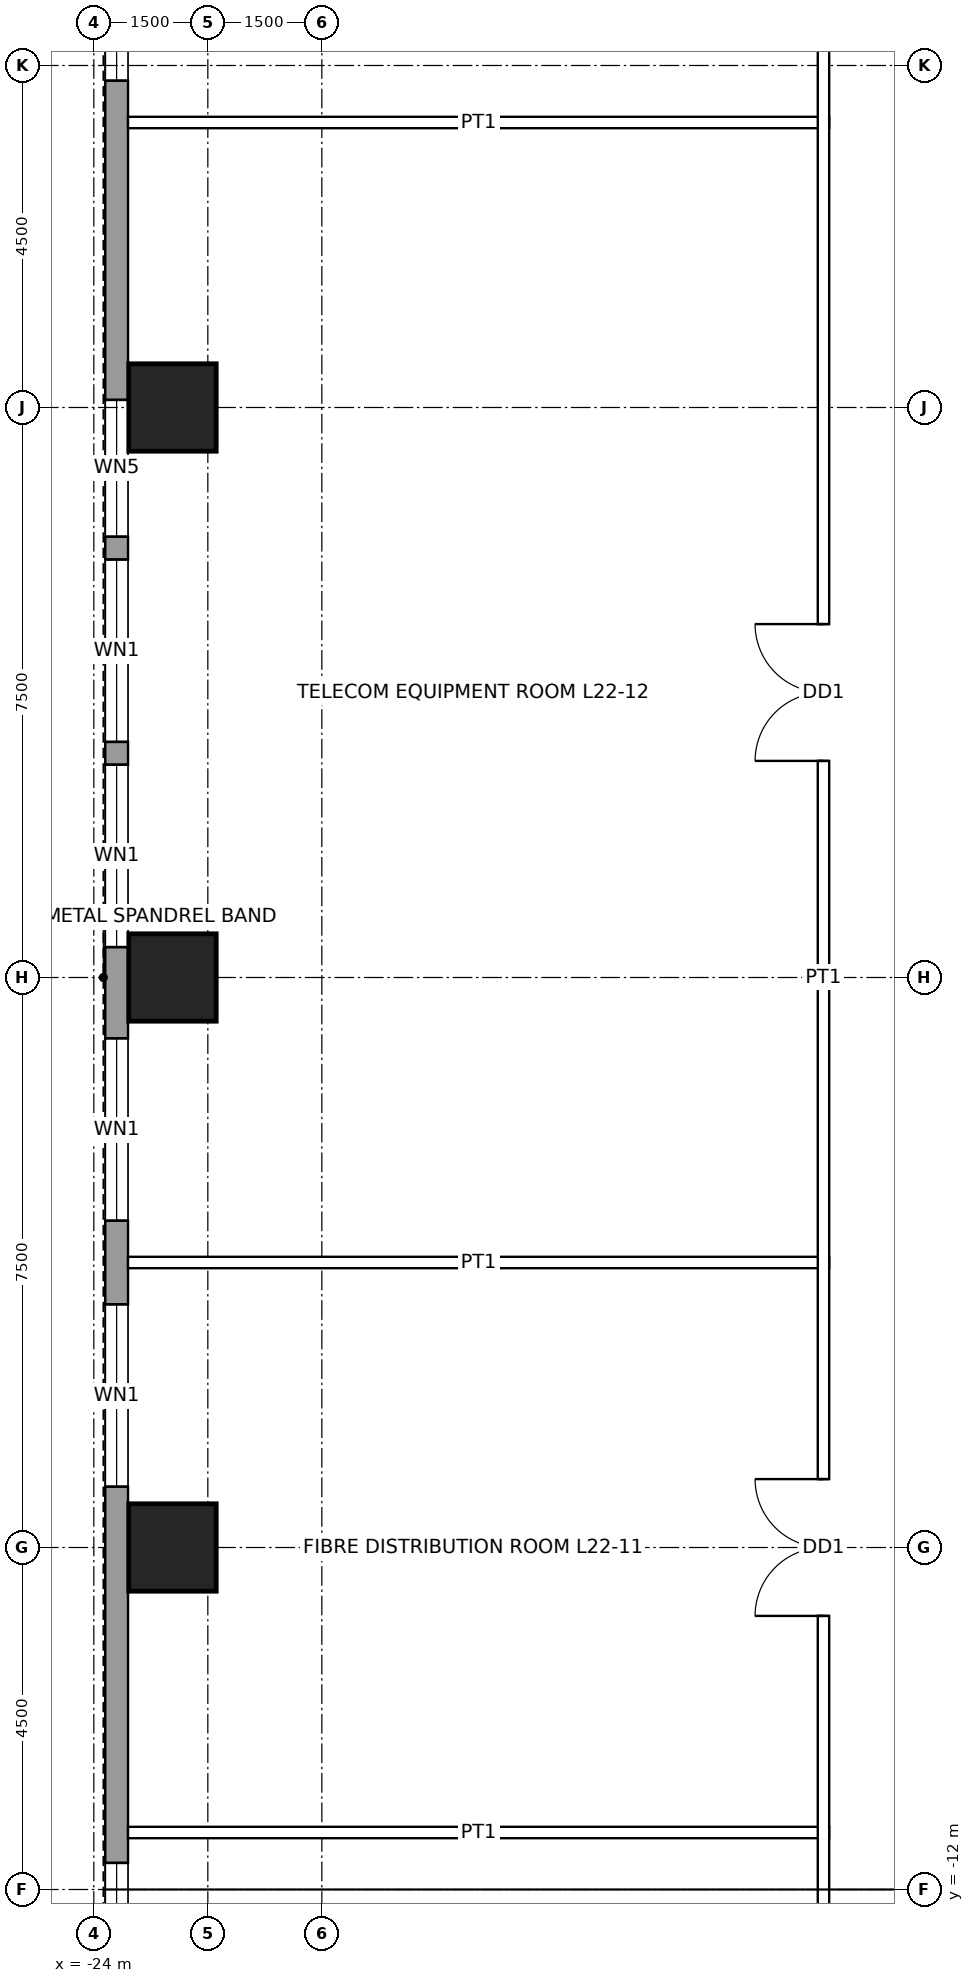
"""IFC4 building model, lengths in metres.
Left out: names, types, materials, properties, quantities, classifications, styles, units other than length and angle.
Written with IfcOpenShell. Run it as: python <this file> out.ifc"""

import sys

from ifc_helpers import new_model, si_unit, direction, frame, frame_2d, origin, origin_2d, place, context, subcontext, project, spatial, rectangle, hollow_rectangle, extrude, element, fill, save


model = new_model("IFC4")
c1 = context("Model", 3, precision=1e-05, world=origin(), true_north=direction((0.0, 1.0)))
c2 = subcontext(c1, "Body", "Model", "MODEL_VIEW")
j1 = project(units=[si_unit("LENGTHUNIT", "METRE"), si_unit("PLANEANGLEUNIT", "RADIAN")], contexts=[c1])
p1 = place(None, origin())
s1 = spatial("IfcSite", under=j1, at=p1, CompositionType="ELEMENT")
p2 = place(p1, origin())
s2 = spatial("IfcBuilding", under=s1, at=p2, CompositionType="ELEMENT")
p3 = place(p2, frame((0.0, 0.0, 113.4)))
s3 = spatial("IfcBuildingStorey", under=s2, at=p3, CompositionType="ELEMENT", Elevation=113.4)
for number, where, z_axis, x_axis in (
    (1, (-22.965, -7.5, 0.0), (0.0, 0.0, 1.0), (1.0, 0.0, 0.0)),
    (2, (-22.965, 0.0, 0.0), (0.0, 0.0, 1.0), (1.0, 0.0, 0.0)),
    (3, (-22.965, 7.5, 0.0), (0.0, 0.0, 1.0), (1.0, 0.0, 0.0)),
):
    element("IfcColumn", number, at=place(p3, frame(where, z_axis=z_axis, x_axis=x_axis)), inside=s3, PredefinedType="COLUMN", context=c2, shape_type="SweptSolid", body=[
        extrude(hollow_rectangle(XDim=1.15, YDim=1.15, WallThickness=0.075, at=origin_2d()), origin(), (0.0, 0.0, 1.0), 4.5),
    ])
p4 = place(p3, frame((-23.7, -16.2, 0.0), z_axis=(0.0, 0.0, 1.0), x_axis=(0.0, 1.0, 0.0)))
e4 = element("IfcWall", 4, at=p4, inside=s3, PredefinedType="SOLIDWALL", context=c2, shape_type="SweptSolid", body=[
    extrude(rectangle(XDim=32.4, YDim=0.3, at=frame_2d((16.2, 0.0))), origin(), (0.0, 0.0, 1.0), 4.3),
])
p5 = place(p4, frame((0.65, 0.0, 1.0)))
e5 = element("IfcOpeningElement", 5, at=p5, cuts=e4, PredefinedType="OPENING", context=c2, shape_type="SweptSolid", body=[
    extrude(rectangle(XDim=1.8, YDim=1.2, at=frame_2d((0.9, 0.6))), frame((0.0, 0.16, 0.0), z_axis=(0.0, -1.0, 0.0), x_axis=(1.0, 0.0, 0.0)), (0.0, 0.0, 1.0), 0.32),
])
p6 = place(p4, frame((2.75, 0.0, 1.0)))
e6 = element("IfcOpeningElement", 6, at=p6, cuts=e4, PredefinedType="OPENING", context=c2, shape_type="SweptSolid", body=[
    extrude(rectangle(XDim=1.8, YDim=1.2, at=frame_2d((0.9, 0.6))), frame((0.0, 0.16, 0.0), z_axis=(0.0, -1.0, 0.0), x_axis=(1.0, 0.0, 0.0)), (0.0, 0.0, 1.0), 0.32),
])
p7 = place(p4, frame((9.5, 0.0, 1.0)))
e7 = element("IfcOpeningElement", 7, at=p7, cuts=e4, PredefinedType="OPENING", context=c2, shape_type="SweptSolid", body=[
    extrude(rectangle(XDim=2.4, YDim=1.2, at=frame_2d((1.2, 0.6))), frame((0.0, 0.16, 0.0), z_axis=(0.0, -1.0, 0.0), x_axis=(1.0, 0.0, 0.0)), (0.0, 0.0, 1.0), 0.32),
])
p8 = place(p4, frame((13.0, 0.0, 1.0)))
e8 = element("IfcOpeningElement", 8, at=p8, cuts=e4, PredefinedType="OPENING", context=c2, shape_type="SweptSolid", body=[
    extrude(rectangle(XDim=2.4, YDim=1.2, at=frame_2d((1.2, 0.6))), frame((0.0, 0.16, 0.0), z_axis=(0.0, -1.0, 0.0), x_axis=(1.0, 0.0, 0.0)), (0.0, 0.0, 1.0), 0.32),
])
p9 = place(p4, frame((16.6, 0.0, 1.0)))
e9 = element("IfcOpeningElement", 9, at=p9, cuts=e4, PredefinedType="OPENING", context=c2, shape_type="SweptSolid", body=[
    extrude(rectangle(XDim=2.4, YDim=1.2, at=frame_2d((1.2, 0.6))), frame((0.0, 0.16, 0.0), z_axis=(0.0, -1.0, 0.0), x_axis=(1.0, 0.0, 0.0)), (0.0, 0.0, 1.0), 0.32),
])
p10 = place(p4, frame((19.3, 0.0, 1.0)))
e10 = element("IfcOpeningElement", 10, at=p10, cuts=e4, PredefinedType="OPENING", context=c2, shape_type="SweptSolid", body=[
    extrude(rectangle(XDim=2.4, YDim=1.2, at=frame_2d((1.2, 0.6))), frame((0.0, 0.16, 0.0), z_axis=(0.0, -1.0, 0.0), x_axis=(1.0, 0.0, 0.0)), (0.0, 0.0, 1.0), 0.32),
])
p11 = place(p4, frame((22.0, 0.0, 1.0)))
e11 = element("IfcOpeningElement", 11, at=p11, cuts=e4, PredefinedType="OPENING", context=c2, shape_type="SweptSolid", body=[
    extrude(rectangle(XDim=1.8, YDim=1.2, at=frame_2d((0.9, 0.6))), frame((0.0, 0.16, 0.0), z_axis=(0.0, -1.0, 0.0), x_axis=(1.0, 0.0, 0.0)), (0.0, 0.0, 1.0), 0.32),
])
p12 = place(p4, frame((28.0, 0.0, 1.0)))
e12 = element("IfcOpeningElement", 12, at=p12, cuts=e4, PredefinedType="OPENING", context=c2, shape_type="SweptSolid", body=[
    extrude(rectangle(XDim=2.4, YDim=1.2, at=frame_2d((1.2, 0.6))), frame((0.0, 0.16, 0.0), z_axis=(0.0, -1.0, 0.0), x_axis=(1.0, 0.0, 0.0)), (0.0, 0.0, 1.0), 0.32),
])
for number, where, z_axis, x_axis in (
    (13, (-23.55, -11.25, 0.0), (0.0, 0.0, 1.0), (1.0, 0.0, 0.0)),
    (14, (-23.55, -3.75, 0.0), (0.0, 0.0, 1.0), (1.0, 0.0, 0.0)),
    (15, (-23.55, 11.25, 0.0), (0.0, 0.0, 1.0), (1.0, 0.0, 0.0)),
):
    element("IfcWall", number, at=place(p3, frame(where, z_axis=z_axis, x_axis=x_axis)), inside=s3, PredefinedType="PARTITIONING", context=c2, shape_type="SweptSolid", body=[
        extrude(rectangle(XDim=9.225, YDim=0.15, at=frame_2d((4.613, 0.0))), origin(), (0.0, 0.0, 1.0), 3.431),
    ])
p13 = place(p3, frame((-14.4, -14.475, 0.0), z_axis=(0.0, 0.0, 1.0), x_axis=(0.0, 1.0, 0.0)))
e16 = element("IfcWall", 16, at=p13, inside=s3, PredefinedType="PARTITIONING", context=c2, shape_type="SweptSolid", body=[
    extrude(rectangle(XDim=28.95, YDim=0.15, at=frame_2d((14.475, 0.0))), origin(), (0.0, 0.0, 1.0), 4.3),
])
p14 = place(p13, frame((6.075, 0.0, 0.0)))
e17 = element("IfcOpeningElement", 17, at=p14, cuts=e16, PredefinedType="OPENING", context=c2, shape_type="SweptSolid", body=[
    extrude(rectangle(XDim=1.8, YDim=2.4, at=frame_2d((0.9, 1.2))), frame((0.0, 0.085, 0.0), z_axis=(0.0, -1.0, 0.0), x_axis=(1.0, 0.0, 0.0)), (0.0, 0.0, 1.0), 0.17),
])
p15 = place(p13, frame((17.325, 0.0, 0.0)))
e18 = element("IfcOpeningElement", 18, at=p15, cuts=e16, PredefinedType="OPENING", context=c2, shape_type="SweptSolid", body=[
    extrude(rectangle(XDim=1.8, YDim=2.4, at=frame_2d((0.9, 1.2))), frame((0.0, 0.085, 0.0), z_axis=(0.0, -1.0, 0.0), x_axis=(1.0, 0.0, 0.0)), (0.0, 0.0, 1.0), 0.17),
])
p16 = place(p6, origin())
e19 = element("IfcWindow", 19, at=p16, inside=s3, PartitioningType="SINGLE_PANEL", PredefinedType="WINDOW", context=c2, shape_type="SweptSolid", body=[
    extrude(rectangle(XDim=1.8, YDim=1.2, at=frame_2d((0.9, 0.6))), frame((0.0, 0.03, 0.0), z_axis=(0.0, -1.0, 0.0), x_axis=(1.0, 0.0, 0.0)), (0.0, 0.0, 1.0), 0.06),
])
fill(e6, e19)
p17 = place(p7, origin())
e20 = element("IfcWindow", 20, at=p17, inside=s3, PartitioningType="SINGLE_PANEL", PredefinedType="WINDOW", context=c2, shape_type="SweptSolid", body=[
    extrude(rectangle(XDim=2.4, YDim=1.2, at=frame_2d((1.2, 0.6))), frame((0.0, 0.03, 0.0), z_axis=(0.0, -1.0, 0.0), x_axis=(1.0, 0.0, 0.0)), (0.0, 0.0, 1.0), 0.06),
])
fill(e7, e20)
p18 = place(p8, origin())
e21 = element("IfcWindow", 21, at=p18, inside=s3, PartitioningType="SINGLE_PANEL", PredefinedType="WINDOW", context=c2, shape_type="SweptSolid", body=[
    extrude(rectangle(XDim=2.4, YDim=1.2, at=frame_2d((1.2, 0.6))), frame((0.0, 0.03, 0.0), z_axis=(0.0, -1.0, 0.0), x_axis=(1.0, 0.0, 0.0)), (0.0, 0.0, 1.0), 0.06),
])
fill(e8, e21)
p19 = place(p9, origin())
e22 = element("IfcWindow", 22, at=p19, inside=s3, PartitioningType="SINGLE_PANEL", PredefinedType="WINDOW", context=c2, shape_type="SweptSolid", body=[
    extrude(rectangle(XDim=2.4, YDim=1.2, at=frame_2d((1.2, 0.6))), frame((0.0, 0.03, 0.0), z_axis=(0.0, -1.0, 0.0), x_axis=(1.0, 0.0, 0.0)), (0.0, 0.0, 1.0), 0.06),
])
fill(e9, e22)
p20 = place(p10, origin())
e23 = element("IfcWindow", 23, at=p20, inside=s3, PartitioningType="SINGLE_PANEL", PredefinedType="WINDOW", context=c2, shape_type="SweptSolid", body=[
    extrude(rectangle(XDim=2.4, YDim=1.2, at=frame_2d((1.2, 0.6))), frame((0.0, 0.03, 0.0), z_axis=(0.0, -1.0, 0.0), x_axis=(1.0, 0.0, 0.0)), (0.0, 0.0, 1.0), 0.06),
])
fill(e10, e23)
p21 = place(p11, origin())
e24 = element("IfcWindow", 24, at=p21, inside=s3, PartitioningType="SINGLE_PANEL", PredefinedType="WINDOW", context=c2, shape_type="SweptSolid", body=[
    extrude(rectangle(XDim=1.8, YDim=1.2, at=frame_2d((0.9, 0.6))), frame((0.0, 0.03, 0.0), z_axis=(0.0, -1.0, 0.0), x_axis=(1.0, 0.0, 0.0)), (0.0, 0.0, 1.0), 0.06),
])
fill(e11, e24)
p22 = place(p12, origin())
e25 = element("IfcWindow", 25, at=p22, inside=s3, PartitioningType="SINGLE_PANEL", PredefinedType="WINDOW", context=c2, shape_type="SweptSolid", body=[
    extrude(rectangle(XDim=2.4, YDim=1.2, at=frame_2d((1.2, 0.6))), frame((0.0, 0.03, 0.0), z_axis=(0.0, -1.0, 0.0), x_axis=(1.0, 0.0, 0.0)), (0.0, 0.0, 1.0), 0.06),
])
fill(e12, e25)
p23 = place(p14, origin())
e26 = element("IfcDoor", 26, at=p23, inside=s3, OperationType="DOUBLE_DOOR_SINGLE_SWING", PredefinedType="DOOR", context=c2, shape_type="SweptSolid", body=[
    extrude(rectangle(XDim=1.8, YDim=2.4, at=frame_2d((0.9, 1.2))), frame((0.0, 0.025, 0.0), z_axis=(0.0, -1.0, 0.0), x_axis=(1.0, 0.0, 0.0)), (0.0, 0.0, 1.0), 0.05),
])
fill(e17, e26)
p24 = place(p15, origin())
e27 = element("IfcDoor", 27, at=p24, inside=s3, OperationType="DOUBLE_DOOR_SINGLE_SWING", PredefinedType="DOOR", context=c2, shape_type="SweptSolid", body=[
    extrude(rectangle(XDim=1.8, YDim=2.4, at=frame_2d((0.9, 1.2))), frame((0.0, 0.025, 0.0), z_axis=(0.0, -1.0, 0.0), x_axis=(1.0, 0.0, 0.0)), (0.0, 0.0, 1.0), 0.05),
])
fill(e18, e27)
save(model, sys.argv[1])
